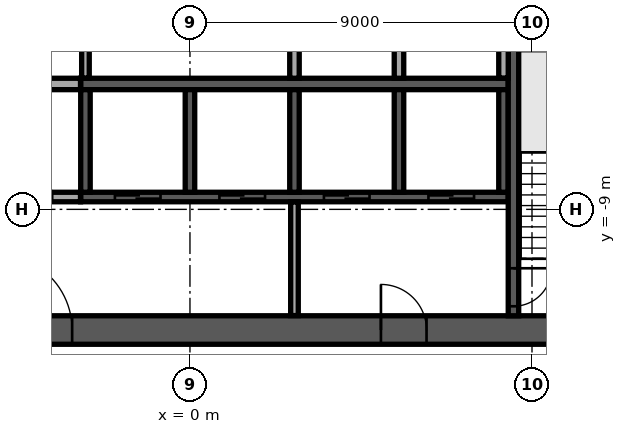
"""IFC4 building model, lengths in metres.
Left out: names, types, materials, properties, quantities, classifications, styles, units other than length and angle.
Written with IfcOpenShell. Run it as: python <this file> out.ifc"""

import sys

from ifc_helpers import new_model, si_unit, direction, frame, frame_2d, origin, place, context, subcontext, project, spatial, rectangle, extrude, element, fill, save


model = new_model("IFC4")
c1 = context("Model", 3, precision=1e-05, world=origin(), true_north=direction((0.0, 1.0)))
c2 = subcontext(c1, "Body", "Model", "MODEL_VIEW")
j1 = project(units=[si_unit("LENGTHUNIT", "METRE"), si_unit("PLANEANGLEUNIT", "RADIAN")], contexts=[c1])
p1 = place(None, origin())
s1 = spatial("IfcSite", under=j1, at=p1, CompositionType="ELEMENT")
p2 = place(p1, origin())
s2 = spatial("IfcBuilding", under=s1, at=p2, CompositionType="ELEMENT")
p3 = place(p2, frame((0.0, 0.0, 274.9)))
s3 = spatial("IfcBuildingStorey", under=s2, at=p3, CompositionType="ELEMENT", Elevation=274.9)
p4 = place(p3, frame((-12.55, -12.175, 0.0), z_axis=(0.0, 0.0, 1.0), x_axis=(1.0, 0.0, 0.0)))
e1 = element("IfcWall", 1, at=p4, inside=s3, PredefinedType="SHEAR", context=c2, shape_type="SweptSolid", body=[
    extrude(rectangle(XDim=25.1, YDim=0.75, at=frame_2d((12.55, 0.0))), origin(), (0.0, 0.0, 1.0), 3.64),
])
p5 = place(p4, frame((7.45, 0.0, 0.0)))
e2 = element("IfcOpeningElement", 2, at=p5, cuts=e1, PredefinedType="OPENING", context=c2, shape_type="SweptSolid", body=[
    extrude(rectangle(XDim=2.0, YDim=2.1, at=frame_2d((1.0, 1.05))), frame((0.0, 0.385, 0.0), z_axis=(0.0, -1.0, 0.0), x_axis=(1.0, 0.0, 0.0)), (0.0, 0.0, 1.0), 0.77),
])
p6 = place(p4, frame((17.575, 0.0, 0.0)))
e3 = element("IfcOpeningElement", 3, at=p6, cuts=e1, PredefinedType="OPENING", context=c2, shape_type="SweptSolid", body=[
    extrude(rectangle(XDim=1.2, YDim=2.1, at=frame_2d((0.6, 1.05))), frame((0.0, 0.385, 0.0), z_axis=(0.0, -1.0, 0.0), x_axis=(1.0, 0.0, 0.0)), (0.0, 0.0, 1.0), 0.77),
])
p7 = place(p4, frame((1.725, 0.0, 0.0)))
e4 = element("IfcOpeningElement", 4, at=p7, cuts=e1, PredefinedType="OPENING", context=c2, shape_type="SweptSolid", body=[
    extrude(rectangle(XDim=1.2, YDim=2.1, at=frame_2d((0.6, 1.05))), frame((0.0, 0.385, 0.0), z_axis=(0.0, -1.0, 0.0), x_axis=(1.0, 0.0, 0.0)), (0.0, 0.0, 1.0), 0.77),
])
p8 = place(p4, frame((22.175, 0.0, 0.0)))
e5 = element("IfcOpeningElement", 5, at=p8, cuts=e1, PredefinedType="OPENING", context=c2, shape_type="SweptSolid", body=[
    extrude(rectangle(XDim=1.2, YDim=2.1, at=frame_2d((0.6, 1.05))), frame((0.0, 0.385, 0.0), z_axis=(0.0, -1.0, 0.0), x_axis=(1.0, 0.0, 0.0)), (0.0, 0.0, 1.0), 0.77),
])
p9 = place(p3, frame((-2.875, -5.7, 0.0), z_axis=(0.0, 0.0, 1.0), x_axis=(1.0, 0.0, 0.0)))
e6 = element("IfcWall", 6, at=p9, inside=s3, PredefinedType="SOLIDWALL", context=c2, shape_type="SweptSolid", body=[
    extrude(rectangle(XDim=11.25, YDim=0.3, at=frame_2d((5.625, 0.0))), origin(), (0.0, 0.0, 1.0), 3.64),
])
for number, where, z_axis, x_axis in (
    (7, (2.75, -5.55, 0.0), (0.0, 0.0, 1.0), (0.0, 1.0, 0.0)),
    (8, (5.5, -5.55, 0.0), (0.0, 0.0, 1.0), (0.0, 1.0, 0.0)),
):
    element("IfcWall", number, at=place(p3, frame(where, z_axis=z_axis, x_axis=x_axis)), inside=s3, PredefinedType="SOLIDWALL", context=c2, shape_type="SweptSolid", body=[
        extrude(rectangle(XDim=2.7, YDim=0.25, at=frame_2d((1.35, 0.0))), origin(), (0.0, 0.0, 1.0), 3.64),
    ])
p10 = place(p3, frame((-2.875, -8.675, 0.0), z_axis=(0.0, 0.0, 1.0), x_axis=(1.0, 0.0, 0.0)))
e9 = element("IfcWall", 9, at=p10, inside=s3, PredefinedType="SOLIDWALL", context=c2, shape_type="SweptSolid", body=[
    extrude(rectangle(XDim=11.25, YDim=0.25, at=frame_2d((5.625, 0.0))), origin(), (0.0, 0.0, 1.0), 3.64),
])
p11 = place(p10, frame((0.9, 0.0, 0.0)))
e10 = element("IfcOpeningElement", 10, at=p11, cuts=e9, PredefinedType="OPENING", context=c2, shape_type="SweptSolid", body=[
    extrude(rectangle(XDim=1.2, YDim=2.1, at=frame_2d((0.6, 1.05))), frame((0.0, 0.135, 0.0), z_axis=(0.0, -1.0, 0.0), x_axis=(1.0, 0.0, 0.0)), (0.0, 0.0, 1.0), 0.27),
])
p12 = place(p10, frame((3.65, 0.0, 0.0)))
e11 = element("IfcOpeningElement", 11, at=p12, cuts=e9, PredefinedType="OPENING", context=c2, shape_type="SweptSolid", body=[
    extrude(rectangle(XDim=1.2, YDim=2.1, at=frame_2d((0.6, 1.05))), frame((0.0, 0.135, 0.0), z_axis=(0.0, -1.0, 0.0), x_axis=(1.0, 0.0, 0.0)), (0.0, 0.0, 1.0), 0.27),
])
p13 = place(p10, frame((6.4, 0.0, 0.0)))
e12 = element("IfcOpeningElement", 12, at=p13, cuts=e9, PredefinedType="OPENING", context=c2, shape_type="SweptSolid", body=[
    extrude(rectangle(XDim=1.2, YDim=2.1, at=frame_2d((0.6, 1.05))), frame((0.0, 0.135, 0.0), z_axis=(0.0, -1.0, 0.0), x_axis=(1.0, 0.0, 0.0)), (0.0, 0.0, 1.0), 0.27),
])
p14 = place(p10, frame((9.15, 0.0, 0.0)))
e13 = element("IfcOpeningElement", 13, at=p14, cuts=e9, PredefinedType="OPENING", context=c2, shape_type="SweptSolid", body=[
    extrude(rectangle(XDim=1.2, YDim=2.1, at=frame_2d((0.6, 1.05))), frame((0.0, 0.135, 0.0), z_axis=(0.0, -1.0, 0.0), x_axis=(1.0, 0.0, 0.0)), (0.0, 0.0, 1.0), 0.27),
])
for number, where, z_axis, x_axis in (
    (14, (-2.75, -8.55, 0.0), (0.0, 0.0, 1.0), (0.0, 1.0, 0.0)),
    (15, (0.0, -8.55, 0.0), (0.0, 0.0, 1.0), (0.0, 1.0, 0.0)),
    (16, (2.75, -8.55, 0.0), (0.0, 0.0, 1.0), (0.0, 1.0, 0.0)),
    (17, (5.5, -8.55, 0.0), (0.0, 0.0, 1.0), (0.0, 1.0, 0.0)),
    (18, (8.25, -8.55, 0.0), (0.0, 0.0, 1.0), (0.0, 1.0, 0.0)),
):
    element("IfcWall", number, at=place(p3, frame(where, z_axis=z_axis, x_axis=x_axis)), inside=s3, PredefinedType="SOLIDWALL", context=c2, shape_type="SweptSolid", body=[
        extrude(rectangle(XDim=2.7, YDim=0.25, at=frame_2d((1.35, 0.0))), origin(), (0.0, 0.0, 1.0), 3.64),
    ])
p15 = place(p3, frame((8.512, -4.55, 0.0), z_axis=(0.0, 0.0, 1.0), x_axis=(0.0, -1.0, 0.0)))
e19 = element("IfcWall", 19, at=p15, inside=s3, PredefinedType="SOLIDWALL", context=c2, shape_type="SweptSolid", body=[
    extrude(rectangle(XDim=7.25, YDim=0.275, at=frame_2d((3.625, 0.0))), origin(), (0.0, 0.0, 1.0), 3.64),
])
p16 = place(p15, frame((6.0, 0.0, 0.0)))
e20 = element("IfcOpeningElement", 20, at=p16, cuts=e19, PredefinedType="OPENING", context=c2, shape_type="SweptSolid", body=[
    extrude(rectangle(XDim=1.0, YDim=2.1, at=frame_2d((0.5, 1.05))), frame((0.0, 0.147, 0.0), z_axis=(0.0, -1.0, 0.0), x_axis=(1.0, 0.0, 0.0)), (0.0, 0.0, 1.0), 0.295),
])
p17 = place(p3, frame((2.75, -11.795, 0.0), z_axis=(0.0, 0.0, 1.0), x_axis=(0.0, 1.0, 0.0)))
e21 = element("IfcWall", 21, at=p17, inside=s3, PredefinedType="PARTITIONING", context=c2, shape_type="SweptSolid", body=[
    extrude(rectangle(XDim=2.99, YDim=0.2, at=frame_2d((1.495, 0.0))), origin(), (0.0, 0.0, 1.0), 3.64),
])
p18 = place(p3, frame((-8.37, -8.675, 0.0), z_axis=(0.0, 0.0, 1.0), x_axis=(1.0, 0.0, 0.0)))
e22 = element("IfcWall", 22, at=p18, inside=s3, PredefinedType="PARTITIONING", context=c2, shape_type="SweptSolid", body=[
    extrude(rectangle(XDim=5.49, YDim=0.25, at=frame_2d((2.745, 0.0))), origin(), (0.0, 0.0, 1.0), 3.64),
])
p19 = place(p18, frame((0.995, 0.0, 0.0)))
e23 = element("IfcOpeningElement", 23, at=p19, cuts=e22, PredefinedType="OPENING", context=c2, shape_type="SweptSolid", body=[
    extrude(rectangle(XDim=1.0, YDim=2.1, at=frame_2d((0.5, 1.05))), frame((0.0, 0.135, 0.0), z_axis=(0.0, -1.0, 0.0), x_axis=(1.0, 0.0, 0.0)), (0.0, 0.0, 1.0), 0.27),
])
p20 = place(p18, frame((3.745, 0.0, 0.0)))
e24 = element("IfcOpeningElement", 24, at=p20, cuts=e22, PredefinedType="OPENING", context=c2, shape_type="SweptSolid", body=[
    extrude(rectangle(XDim=1.0, YDim=2.1, at=frame_2d((0.5, 1.05))), frame((0.0, 0.135, 0.0), z_axis=(0.0, -1.0, 0.0), x_axis=(1.0, 0.0, 0.0)), (0.0, 0.0, 1.0), 0.27),
])
p21 = place(p3, frame((-8.35, -5.7, 0.0), z_axis=(0.0, 0.0, 1.0), x_axis=(1.0, 0.0, 0.0)))
e25 = element("IfcWall", 25, at=p21, inside=s3, PredefinedType="PARTITIONING", context=c2, shape_type="SweptSolid", body=[
    extrude(rectangle(XDim=5.47, YDim=0.3, at=frame_2d((2.735, 0.0))), origin(), (0.0, 0.0, 1.0), 3.64),
])
p22 = place(p3, frame((-2.75, -5.545, 0.0), z_axis=(0.0, 0.0, 1.0), x_axis=(0.0, 1.0, 0.0)))
e26 = element("IfcWall", 26, at=p22, inside=s3, PredefinedType="PARTITIONING", context=c2, shape_type="SweptSolid", body=[
    extrude(rectangle(XDim=2.69, YDim=0.2, at=frame_2d((1.345, 0.0))), origin(), (0.0, 0.0, 1.0), 3.64),
])
p23 = place(p3, frame((8.25, -5.545, 0.0), z_axis=(0.0, 0.0, 1.0), x_axis=(0.0, 1.0, 0.0)))
e27 = element("IfcWall", 27, at=p23, inside=s3, PredefinedType="PARTITIONING", context=c2, shape_type="SweptSolid", body=[
    extrude(rectangle(XDim=2.69, YDim=0.25, at=frame_2d((1.345, 0.0))), origin(), (0.0, 0.0, 1.0), 3.64),
])
p24 = place(p3, frame((9.233, -32.479, 0.0), z_axis=(0.0, 0.0, 1.0), x_axis=(0.469468429065, 0.882949259081, 0.0)))
e28 = element("IfcWall", 28, at=p24, inside=s3, PredefinedType="STANDARD", context=c2, shape_type="SweptSolid", body=[
    extrude(rectangle(XDim=48.686, YDim=0.6, at=frame_2d((24.343, 0.0))), origin(), (0.0, 0.0, 1.0), 3.64),
])
p25 = place(p24, frame((1.213, 0.0, 0.9)))
e29 = element("IfcOpeningElement", 29, at=p25, cuts=e28, PredefinedType="OPENING", context=c2, shape_type="SweptSolid", body=[
    extrude(rectangle(XDim=2.0, YDim=2.1, at=frame_2d((1.0, 1.05))), frame((0.0, 0.31, 0.0), z_axis=(0.0, -1.0, 0.0), x_axis=(1.0, 0.0, 0.0)), (0.0, 0.0, 1.0), 0.62),
])
p26 = place(p24, frame((5.639, 0.0, 0.9)))
e30 = element("IfcOpeningElement", 30, at=p26, cuts=e28, PredefinedType="OPENING", context=c2, shape_type="SweptSolid", body=[
    extrude(rectangle(XDim=2.0, YDim=2.1, at=frame_2d((1.0, 1.05))), frame((0.0, 0.31, 0.0), z_axis=(0.0, -1.0, 0.0), x_axis=(1.0, 0.0, 0.0)), (0.0, 0.0, 1.0), 0.62),
])
p27 = place(p24, frame((10.065, 0.0, 0.9)))
e31 = element("IfcOpeningElement", 31, at=p27, cuts=e28, PredefinedType="OPENING", context=c2, shape_type="SweptSolid", body=[
    extrude(rectangle(XDim=2.0, YDim=2.1, at=frame_2d((1.0, 1.05))), frame((0.0, 0.31, 0.0), z_axis=(0.0, -1.0, 0.0), x_axis=(1.0, 0.0, 0.0)), (0.0, 0.0, 1.0), 0.62),
])
p28 = place(p24, frame((14.491, 0.0, 0.9)))
e32 = element("IfcOpeningElement", 32, at=p28, cuts=e28, PredefinedType="OPENING", context=c2, shape_type="SweptSolid", body=[
    extrude(rectangle(XDim=2.0, YDim=2.1, at=frame_2d((1.0, 1.05))), frame((0.0, 0.31, 0.0), z_axis=(0.0, -1.0, 0.0), x_axis=(1.0, 0.0, 0.0)), (0.0, 0.0, 1.0), 0.62),
])
p29 = place(p24, frame((18.917, 0.0, 0.9)))
e33 = element("IfcOpeningElement", 33, at=p29, cuts=e28, PredefinedType="OPENING", context=c2, shape_type="SweptSolid", body=[
    extrude(rectangle(XDim=2.0, YDim=2.1, at=frame_2d((1.0, 1.05))), frame((0.0, 0.31, 0.0), z_axis=(0.0, -1.0, 0.0), x_axis=(1.0, 0.0, 0.0)), (0.0, 0.0, 1.0), 0.62),
])
p30 = place(p24, frame((23.343, 0.0, 0.9)))
e34 = element("IfcOpeningElement", 34, at=p30, cuts=e28, PredefinedType="OPENING", context=c2, shape_type="SweptSolid", body=[
    extrude(rectangle(XDim=2.0, YDim=2.1, at=frame_2d((1.0, 1.05))), frame((0.0, 0.31, 0.0), z_axis=(0.0, -1.0, 0.0), x_axis=(1.0, 0.0, 0.0)), (0.0, 0.0, 1.0), 0.62),
])
p31 = place(p24, frame((27.769, 0.0, 0.9)))
e35 = element("IfcOpeningElement", 35, at=p31, cuts=e28, PredefinedType="OPENING", context=c2, shape_type="SweptSolid", body=[
    extrude(rectangle(XDim=2.0, YDim=2.1, at=frame_2d((1.0, 1.05))), frame((0.0, 0.31, 0.0), z_axis=(0.0, -1.0, 0.0), x_axis=(1.0, 0.0, 0.0)), (0.0, 0.0, 1.0), 0.62),
])
p32 = place(p24, frame((32.195, 0.0, 0.9)))
e36 = element("IfcOpeningElement", 36, at=p32, cuts=e28, PredefinedType="OPENING", context=c2, shape_type="SweptSolid", body=[
    extrude(rectangle(XDim=2.0, YDim=2.1, at=frame_2d((1.0, 1.05))), frame((0.0, 0.31, 0.0), z_axis=(0.0, -1.0, 0.0), x_axis=(1.0, 0.0, 0.0)), (0.0, 0.0, 1.0), 0.62),
])
p33 = place(p24, frame((36.621, 0.0, 0.9)))
e37 = element("IfcOpeningElement", 37, at=p33, cuts=e28, PredefinedType="OPENING", context=c2, shape_type="SweptSolid", body=[
    extrude(rectangle(XDim=2.0, YDim=2.1, at=frame_2d((1.0, 1.05))), frame((0.0, 0.31, 0.0), z_axis=(0.0, -1.0, 0.0), x_axis=(1.0, 0.0, 0.0)), (0.0, 0.0, 1.0), 0.62),
])
p34 = place(p24, frame((41.047, 0.0, 0.9)))
e38 = element("IfcOpeningElement", 38, at=p34, cuts=e28, PredefinedType="OPENING", context=c2, shape_type="SweptSolid", body=[
    extrude(rectangle(XDim=2.0, YDim=2.1, at=frame_2d((1.0, 1.05))), frame((0.0, 0.31, 0.0), z_axis=(0.0, -1.0, 0.0), x_axis=(1.0, 0.0, 0.0)), (0.0, 0.0, 1.0), 0.62),
])
p35 = place(p24, frame((45.473, 0.0, 0.9)))
e39 = element("IfcOpeningElement", 39, at=p35, cuts=e28, PredefinedType="OPENING", context=c2, shape_type="SweptSolid", body=[
    extrude(rectangle(XDim=2.0, YDim=2.1, at=frame_2d((1.0, 1.05))), frame((0.0, 0.31, 0.0), z_axis=(0.0, -1.0, 0.0), x_axis=(1.0, 0.0, 0.0)), (0.0, 0.0, 1.0), 0.62),
])
p36 = place(p3, frame((-26.271, -7.606, 0.0), z_axis=(0.0, 0.0, 1.0), x_axis=(0.882946860375, -0.469472940385, 0.0)))
e40 = element("IfcWall", 40, at=p36, inside=s3, PredefinedType="PARTITIONING", context=c2, shape_type="SweptSolid", body=[
    extrude(rectangle(XDim=39.325, YDim=0.15, at=frame_2d((19.662, 0.0))), origin(), (0.0, 0.0, 1.0), 3.04),
])
p37 = place(p36, frame((2.8, 0.0, 0.0)))
e41 = element("IfcOpeningElement", 41, at=p37, cuts=e40, PredefinedType="OPENING", context=c2, shape_type="SweptSolid", body=[
    extrude(rectangle(XDim=1.0, YDim=2.1, at=frame_2d((0.5, 1.05))), frame((0.0, 0.085, 0.0), z_axis=(0.0, -1.0, 0.0), x_axis=(1.0, 0.0, 0.0)), (0.0, 0.0, 1.0), 0.17),
])
p38 = place(p36, frame((6.915, 0.0, 0.0)))
e42 = element("IfcOpeningElement", 42, at=p38, cuts=e40, PredefinedType="OPENING", context=c2, shape_type="SweptSolid", body=[
    extrude(rectangle(XDim=1.0, YDim=2.1, at=frame_2d((0.5, 1.05))), frame((0.0, 0.085, 0.0), z_axis=(0.0, -1.0, 0.0), x_axis=(1.0, 0.0, 0.0)), (0.0, 0.0, 1.0), 0.17),
])
p39 = place(p36, frame((14.499, 0.0, 0.0)))
e43 = element("IfcOpeningElement", 43, at=p39, cuts=e40, PredefinedType="OPENING", context=c2, shape_type="SweptSolid", body=[
    extrude(rectangle(XDim=1.0, YDim=2.1, at=frame_2d((0.5, 1.05))), frame((0.0, 0.085, 0.0), z_axis=(0.0, -1.0, 0.0), x_axis=(1.0, 0.0, 0.0)), (0.0, 0.0, 1.0), 0.17),
])
p40 = place(p36, frame((25.785, 0.0, 0.0)))
e44 = element("IfcOpeningElement", 44, at=p40, cuts=e40, PredefinedType="OPENING", context=c2, shape_type="SweptSolid", body=[
    extrude(rectangle(XDim=1.0, YDim=2.1, at=frame_2d((0.5, 1.05))), frame((0.0, 0.085, 0.0), z_axis=(0.0, -1.0, 0.0), x_axis=(1.0, 0.0, 0.0)), (0.0, 0.0, 1.0), 0.17),
])
p41 = place(p36, frame((37.741, 0.0, 0.0)))
e45 = element("IfcOpeningElement", 45, at=p41, cuts=e40, PredefinedType="OPENING", context=c2, shape_type="SweptSolid", body=[
    extrude(rectangle(XDim=1.0, YDim=2.1, at=frame_2d((0.5, 1.05))), frame((0.0, 0.085, 0.0), z_axis=(0.0, -1.0, 0.0), x_axis=(1.0, 0.0, 0.0)), (0.0, 0.0, 1.0), 0.17),
])
p42 = place(p5, origin())
e46 = element("IfcDoor", 46, at=p42, inside=s3, OperationType="SINGLE_SWING_LEFT", PredefinedType="DOOR", context=c2, shape_type="SweptSolid", body=[
    extrude(rectangle(XDim=2.0, YDim=2.1, at=frame_2d((1.0, 1.05))), frame((0.0, 0.025, 0.0), z_axis=(0.0, -1.0, 0.0), x_axis=(1.0, 0.0, 0.0)), (0.0, 0.0, 1.0), 0.05),
])
fill(e2, e46)
p43 = place(p6, origin())
e47 = element("IfcDoor", 47, at=p43, inside=s3, OperationType="SINGLE_SWING_LEFT", PredefinedType="DOOR", context=c2, shape_type="SweptSolid", body=[
    extrude(rectangle(XDim=1.2, YDim=2.1, at=frame_2d((0.6, 1.05))), frame((0.0, 0.025, 0.0), z_axis=(0.0, -1.0, 0.0), x_axis=(1.0, 0.0, 0.0)), (0.0, 0.0, 1.0), 0.05),
])
fill(e3, e47)
p44 = place(p11, origin())
e48 = element("IfcDoor", 48, at=p44, inside=s3, OperationType="DOUBLE_DOOR_SLIDING", PredefinedType="DOOR", context=c2, shape_type="SweptSolid", body=[
    extrude(rectangle(XDim=1.2, YDim=2.1, at=frame_2d((0.6, 1.05))), frame((0.0, 0.025, 0.0), z_axis=(0.0, -1.0, 0.0), x_axis=(1.0, 0.0, 0.0)), (0.0, 0.0, 1.0), 0.05),
])
fill(e10, e48)
p45 = place(p12, origin())
e49 = element("IfcDoor", 49, at=p45, inside=s3, OperationType="DOUBLE_DOOR_SLIDING", PredefinedType="DOOR", context=c2, shape_type="SweptSolid", body=[
    extrude(rectangle(XDim=1.2, YDim=2.1, at=frame_2d((0.6, 1.05))), frame((0.0, 0.025, 0.0), z_axis=(0.0, -1.0, 0.0), x_axis=(1.0, 0.0, 0.0)), (0.0, 0.0, 1.0), 0.05),
])
fill(e11, e49)
p46 = place(p13, origin())
e50 = element("IfcDoor", 50, at=p46, inside=s3, OperationType="DOUBLE_DOOR_SLIDING", PredefinedType="DOOR", context=c2, shape_type="SweptSolid", body=[
    extrude(rectangle(XDim=1.2, YDim=2.1, at=frame_2d((0.6, 1.05))), frame((0.0, 0.025, 0.0), z_axis=(0.0, -1.0, 0.0), x_axis=(1.0, 0.0, 0.0)), (0.0, 0.0, 1.0), 0.05),
])
fill(e12, e50)
p47 = place(p14, origin())
e51 = element("IfcDoor", 51, at=p47, inside=s3, OperationType="DOUBLE_DOOR_SLIDING", PredefinedType="DOOR", context=c2, shape_type="SweptSolid", body=[
    extrude(rectangle(XDim=1.2, YDim=2.1, at=frame_2d((0.6, 1.05))), frame((0.0, 0.025, 0.0), z_axis=(0.0, -1.0, 0.0), x_axis=(1.0, 0.0, 0.0)), (0.0, 0.0, 1.0), 0.05),
])
fill(e13, e51)
p48 = place(p16, origin())
e52 = element("IfcDoor", 52, at=p48, inside=s3, OperationType="SINGLE_SWING_LEFT", PredefinedType="DOOR", context=c2, shape_type="SweptSolid", body=[
    extrude(rectangle(XDim=1.0, YDim=2.1, at=frame_2d((0.5, 1.05))), frame((0.0, 0.025, 0.0), z_axis=(0.0, -1.0, 0.0), x_axis=(1.0, 0.0, 0.0)), (0.0, 0.0, 1.0), 0.05),
])
fill(e20, e52)
save(model, sys.argv[1])
